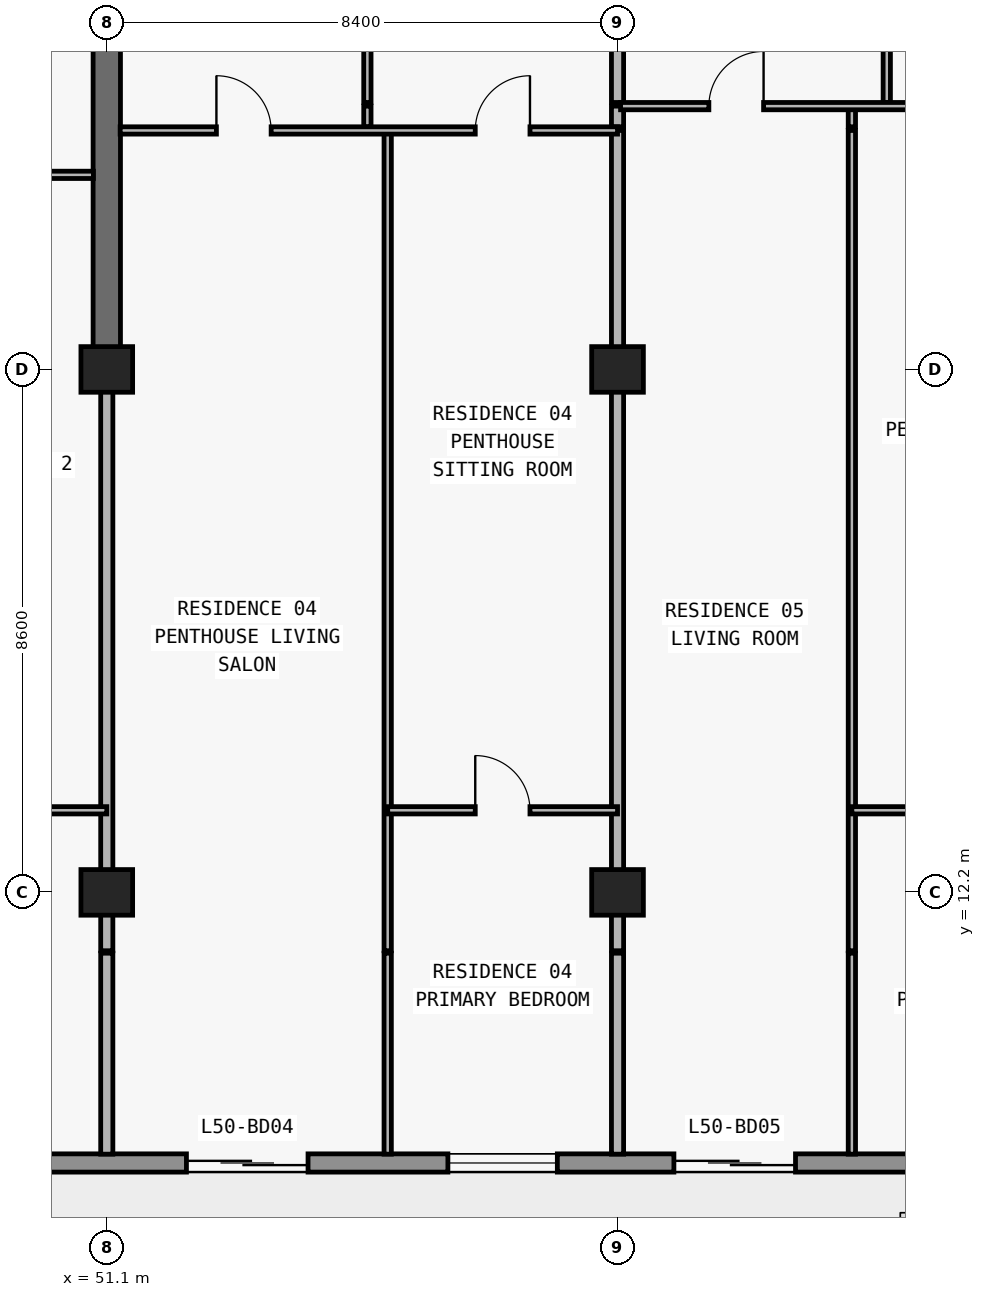
"""IFC4 building model, lengths in metres.
Left out: names, types, materials, properties, quantities, classifications, styles, units other than length and angle.
Written with IfcOpenShell. Run it as: python <this file> out.ifc"""

import sys

from ifc_helpers import new_model, si_unit, direction, frame, frame_2d, origin, origin_2d, place, context, subcontext, project, spatial, rectangle, extrude, element, fill, save


model = new_model("IFC4")
c1 = context("Model", 3, precision=1e-05, world=origin(), true_north=direction((0.0, 1.0)))
c2 = subcontext(c1, "Body", "Model", "MODEL_VIEW")
j1 = project(units=[si_unit("LENGTHUNIT", "METRE"), si_unit("PLANEANGLEUNIT", "RADIAN")], contexts=[c1])
p1 = place(None, origin())
s1 = spatial("IfcSite", under=j1, at=p1, CompositionType="ELEMENT")
p2 = place(p1, origin())
s2 = spatial("IfcBuilding", under=s1, at=p2, CompositionType="ELEMENT")
p3 = place(p2, frame((0.0, 0.0, 180.3)))
s3 = spatial("IfcBuildingStorey", under=s2, at=p3, CompositionType="ELEMENT", Elevation=180.3)
for number, where, z_axis, x_axis in (
    (1, (51.1, 12.2, 0.0), (0.0, 0.0, 1.0), (1.0, 0.0, 0.0)),
    (2, (59.5, 12.2, 0.0), (0.0, 0.0, 1.0), (1.0, 0.0, 0.0)),
    (3, (51.1, 20.8, 0.0), (0.0, 0.0, 1.0), (1.0, 0.0, 0.0)),
    (4, (59.5, 20.8, 0.0), (0.0, 0.0, 1.0), (1.0, 0.0, 0.0)),
):
    element("IfcColumn", number, at=place(p3, frame(where, z_axis=z_axis, x_axis=x_axis)), inside=s3, PredefinedType="COLUMN", context=c2, shape_type="SweptSolid", body=[
        extrude(rectangle(XDim=0.85, YDim=0.75, at=origin_2d()), origin(), (0.0, 0.0, 1.0), 3.0),
    ])
p4 = place(p3, frame((51.1, 20.8, 0.0), z_axis=(0.0, 0.0, 1.0), x_axis=(0.0, 1.0, 0.0)))
e5 = element("IfcWall", 5, at=p4, inside=s3, PredefinedType="SHEAR", context=c2, shape_type="SweptSolid", body=[
    extrude(rectangle(XDim=8.6, YDim=0.45, at=frame_2d((4.3, 0.0))), origin(), (0.0, 0.0, 1.0), 3.0),
])
p5 = place(p3, frame((67.7, 7.75, 0.0), z_axis=(0.0, 0.0, 1.0), x_axis=(-1.0, 0.0, 0.0)))
e6 = element("IfcWall", 6, at=p5, inside=s3, PredefinedType="STANDARD", context=c2, shape_type="SweptSolid", body=[
    extrude(rectangle(XDim=57.6, YDim=0.3, at=frame_2d((28.8, 0.0))), origin(), (0.0, 0.0, 1.0), 3.0),
])
p6 = place(p5, frame((54.673, 0.0, 0.0)))
e7 = element("IfcOpeningElement", 7, at=p6, cuts=e6, PredefinedType="OPENING", context=c2, shape_type="SweptSolid", body=[
    extrude(rectangle(XDim=2.0, YDim=2.3, at=frame_2d((1.0, 1.15))), frame((0.0, 0.16, 0.0), z_axis=(0.0, -1.0, 0.0), x_axis=(1.0, 0.0, 0.0)), (0.0, 0.0, 1.0), 0.32),
])
p7 = place(p5, frame((50.473, 0.0, 0.85)))
e8 = element("IfcOpeningElement", 8, at=p7, cuts=e6, PredefinedType="OPENING", context=c2, shape_type="SweptSolid", body=[
    extrude(rectangle(XDim=2.2, YDim=1.55, at=frame_2d((1.1, 0.775))), frame((0.0, 0.16, 0.0), z_axis=(0.0, -1.0, 0.0), x_axis=(1.0, 0.0, 0.0)), (0.0, 0.0, 1.0), 0.32),
])
p8 = place(p5, frame((46.09, 0.0, 0.0)))
e9 = element("IfcOpeningElement", 9, at=p8, cuts=e6, PredefinedType="OPENING", context=c2, shape_type="SweptSolid", body=[
    extrude(rectangle(XDim=2.0, YDim=2.3, at=frame_2d((1.0, 1.15))), frame((0.0, 0.16, 0.0), z_axis=(0.0, -1.0, 0.0), x_axis=(1.0, 0.0, 0.0)), (0.0, 0.0, 1.0), 0.32),
])
p9 = place(p5, frame((41.99, 0.0, 0.85)))
e10 = element("IfcOpeningElement", 10, at=p9, cuts=e6, PredefinedType="OPENING", context=c2, shape_type="SweptSolid", body=[
    extrude(rectangle(XDim=1.8, YDim=1.55, at=frame_2d((0.9, 0.775))), frame((0.0, 0.16, 0.0), z_axis=(0.0, -1.0, 0.0), x_axis=(1.0, 0.0, 0.0)), (0.0, 0.0, 1.0), 0.32),
])
p10 = place(p5, frame((38.09, 0.0, 0.0)))
e11 = element("IfcOpeningElement", 11, at=p10, cuts=e6, PredefinedType="OPENING", context=c2, shape_type="SweptSolid", body=[
    extrude(rectangle(XDim=2.0, YDim=2.3, at=frame_2d((1.0, 1.15))), frame((0.0, 0.16, 0.0), z_axis=(0.0, -1.0, 0.0), x_axis=(1.0, 0.0, 0.0)), (0.0, 0.0, 1.0), 0.32),
])
p11 = place(p5, frame((33.41, 0.0, 0.65)))
e12 = element("IfcOpeningElement", 12, at=p11, cuts=e6, PredefinedType="OPENING", context=c2, shape_type="SweptSolid", body=[
    extrude(rectangle(XDim=2.6, YDim=1.85, at=frame_2d((1.3, 0.925))), frame((0.0, 0.16, 0.0), z_axis=(0.0, -1.0, 0.0), x_axis=(1.0, 0.0, 0.0)), (0.0, 0.0, 1.0), 0.32),
])
p12 = place(p5, frame((27.7, 0.0, 0.85)))
e13 = element("IfcOpeningElement", 13, at=p12, cuts=e6, PredefinedType="OPENING", context=c2, shape_type="SweptSolid", body=[
    extrude(rectangle(XDim=2.2, YDim=1.55, at=frame_2d((1.1, 0.775))), frame((0.0, 0.16, 0.0), z_axis=(0.0, -1.0, 0.0), x_axis=(1.0, 0.0, 0.0)), (0.0, 0.0, 1.0), 0.32),
])
p13 = place(p5, frame((19.7, 0.0, 0.85)))
e14 = element("IfcOpeningElement", 14, at=p13, cuts=e6, PredefinedType="OPENING", context=c2, shape_type="SweptSolid", body=[
    extrude(rectangle(XDim=2.2, YDim=1.55, at=frame_2d((1.1, 0.775))), frame((0.0, 0.16, 0.0), z_axis=(0.0, -1.0, 0.0), x_axis=(1.0, 0.0, 0.0)), (0.0, 0.0, 1.0), 0.32),
])
p14 = place(p5, frame((13.29, 0.0, 0.0)))
e15 = element("IfcOpeningElement", 15, at=p14, cuts=e6, PredefinedType="OPENING", context=c2, shape_type="SweptSolid", body=[
    extrude(rectangle(XDim=2.0, YDim=2.3, at=frame_2d((1.0, 1.15))), frame((0.0, 0.16, 0.0), z_axis=(0.0, -1.0, 0.0), x_axis=(1.0, 0.0, 0.0)), (0.0, 0.0, 1.0), 0.32),
])
p15 = place(p5, frame((9.19, 0.0, 0.85)))
e16 = element("IfcOpeningElement", 16, at=p15, cuts=e6, PredefinedType="OPENING", context=c2, shape_type="SweptSolid", body=[
    extrude(rectangle(XDim=1.8, YDim=1.55, at=frame_2d((0.9, 0.775))), frame((0.0, 0.16, 0.0), z_axis=(0.0, -1.0, 0.0), x_axis=(1.0, 0.0, 0.0)), (0.0, 0.0, 1.0), 0.32),
])
p16 = place(p5, frame((5.273, 0.0, 0.0)))
e17 = element("IfcOpeningElement", 17, at=p16, cuts=e6, PredefinedType="OPENING", context=c2, shape_type="SweptSolid", body=[
    extrude(rectangle(XDim=2.0, YDim=2.3, at=frame_2d((1.0, 1.15))), frame((0.0, 0.16, 0.0), z_axis=(0.0, -1.0, 0.0), x_axis=(1.0, 0.0, 0.0)), (0.0, 0.0, 1.0), 0.32),
])
p17 = place(p5, frame((1.073, 0.0, 0.85)))
e18 = element("IfcOpeningElement", 18, at=p17, cuts=e6, PredefinedType="OPENING", context=c2, shape_type="SweptSolid", body=[
    extrude(rectangle(XDim=2.2, YDim=1.55, at=frame_2d((1.1, 0.775))), frame((0.0, 0.16, 0.0), z_axis=(0.0, -1.0, 0.0), x_axis=(1.0, 0.0, 0.0)), (0.0, 0.0, 1.0), 0.32),
])
p18 = place(p3, frame((51.1, 7.895, 0.0), z_axis=(0.0, 0.0, 1.0), x_axis=(0.0, 1.0, 0.0)))
e19 = element("IfcWall", 19, at=p18, inside=s3, PredefinedType="PARTITIONING", context=c2, shape_type="SweptSolid", body=[
    extrude(rectangle(XDim=3.305, YDim=0.2, at=frame_2d((1.652, 0.0))), origin(), (0.0, 0.0, 1.0), 3.0),
])
p19 = place(p3, frame((51.1, 11.24, 0.0), z_axis=(0.0, 0.0, 1.0), x_axis=(0.0, 1.0, 0.0)))
e20 = element("IfcWall", 20, at=p19, inside=s3, PredefinedType="PARTITIONING", context=c2, shape_type="SweptSolid", body=[
    extrude(rectangle(XDim=9.555, YDim=0.2, at=frame_2d((4.777, 0.0))), origin(), (0.0, 0.0, 1.0), 2.213),
])
p20 = place(p3, frame((55.386, 24.79, 0.0), z_axis=(0.0, 0.0, 1.0), x_axis=(0.0, 1.0, 0.0)))
e21 = element("IfcWall", 21, at=p20, inside=s3, PredefinedType="PARTITIONING", context=c2, shape_type="SweptSolid", body=[
    extrude(rectangle(XDim=0.34, YDim=0.12, at=frame_2d((0.17, 0.0))), origin(), (0.0, 0.0, 1.0), 3.0),
])
p21 = place(p3, frame((55.386, 25.19, 0.0), z_axis=(0.0, 0.0, 1.0), x_axis=(0.0, 1.0, 0.0)))
e22 = element("IfcWall", 22, at=p21, inside=s3, PredefinedType="PARTITIONING", context=c2, shape_type="SweptSolid", body=[
    extrude(rectangle(XDim=4.69, YDim=0.12, at=frame_2d((2.345, 0.0))), origin(), (0.0, 0.0, 1.0), 2.675),
])
p22 = place(p21, frame((1.895, 0.0, 0.0)))
e23 = element("IfcOpeningElement", 23, at=p22, cuts=e22, PredefinedType="OPENING", context=c2, shape_type="SweptSolid", body=[
    extrude(rectangle(XDim=0.9, YDim=2.15, at=frame_2d((0.45, 1.075))), frame((0.0, 0.07, 0.0), z_axis=(0.0, -1.0, 0.0), x_axis=(1.0, 0.0, 0.0)), (0.0, 0.0, 1.0), 0.14),
])
p23 = place(p3, frame((55.72, 7.895, 0.0), z_axis=(0.0, 0.0, 1.0), x_axis=(0.0, 1.0, 0.0)))
e24 = element("IfcWall", 24, at=p23, inside=s3, PredefinedType="PARTITIONING", context=c2, shape_type="SweptSolid", body=[
    extrude(rectangle(XDim=3.305, YDim=0.12, at=frame_2d((1.652, 0.0))), origin(), (0.0, 0.0, 1.0), 3.0),
])
p24 = place(p3, frame((55.72, 11.24, 0.0), z_axis=(0.0, 0.0, 1.0), x_axis=(0.0, 1.0, 0.0)))
e25 = element("IfcWall", 25, at=p24, inside=s3, PredefinedType="PARTITIONING", context=c2, shape_type="SweptSolid", body=[
    extrude(rectangle(XDim=13.49, YDim=0.12, at=frame_2d((6.745, 0.0))), origin(), (0.0, 0.0, 1.0), 3.0),
])
p25 = place(p3, frame((59.5, 7.895, 0.0), z_axis=(0.0, 0.0, 1.0), x_axis=(0.0, 1.0, 0.0)))
e26 = element("IfcWall", 26, at=p25, inside=s3, PredefinedType="PARTITIONING", context=c2, shape_type="SweptSolid", body=[
    extrude(rectangle(XDim=3.305, YDim=0.2, at=frame_2d((1.652, 0.0))), origin(), (0.0, 0.0, 1.0), 3.0),
])
p26 = place(p3, frame((59.5, 11.24, 0.0), z_axis=(0.0, 0.0, 1.0), x_axis=(0.0, 1.0, 0.0)))
e27 = element("IfcWall", 27, at=p26, inside=s3, PredefinedType="PARTITIONING", context=c2, shape_type="SweptSolid", body=[
    extrude(rectangle(XDim=13.49, YDim=0.2, at=frame_2d((6.745, 0.0))), origin(), (0.0, 0.0, 1.0), 2.213),
])
p27 = place(p3, frame((59.5, 24.79, 0.0), z_axis=(0.0, 0.0, 1.0), x_axis=(0.0, 1.0, 0.0)))
e28 = element("IfcWall", 28, at=p27, inside=s3, PredefinedType="PARTITIONING", context=c2, shape_type="SweptSolid", body=[
    extrude(rectangle(XDim=0.34, YDim=0.2, at=frame_2d((0.17, 0.0))), origin(), (0.0, 0.0, 1.0), 2.213),
])
p28 = place(p3, frame((59.5, 25.19, 0.0), z_axis=(0.0, 0.0, 1.0), x_axis=(0.0, 1.0, 0.0)))
e29 = element("IfcWall", 29, at=p28, inside=s3, PredefinedType="PARTITIONING", context=c2, shape_type="SweptSolid", body=[
    extrude(rectangle(XDim=4.69, YDim=0.2, at=frame_2d((2.345, 0.0))), origin(), (0.0, 0.0, 1.0), 2.213),
])
p29 = place(p3, frame((63.354, 7.895, 0.0), z_axis=(0.0, 0.0, 1.0), x_axis=(0.0, 1.0, 0.0)))
e30 = element("IfcWall", 30, at=p29, inside=s3, PredefinedType="PARTITIONING", context=c2, shape_type="SweptSolid", body=[
    extrude(rectangle(XDim=3.305, YDim=0.12, at=frame_2d((1.652, 0.0))), origin(), (0.0, 0.0, 1.0), 3.0),
])
p30 = place(p3, frame((63.354, 11.24, 0.0), z_axis=(0.0, 0.0, 1.0), x_axis=(0.0, 1.0, 0.0)))
e31 = element("IfcWall", 31, at=p30, inside=s3, PredefinedType="PARTITIONING", context=c2, shape_type="SweptSolid", body=[
    extrude(rectangle(XDim=13.49, YDim=0.12, at=frame_2d((6.745, 0.0))), origin(), (0.0, 0.0, 1.0), 3.0),
])
p31 = place(p3, frame((63.354, 24.79, 0.0), z_axis=(0.0, 0.0, 1.0), x_axis=(0.0, 1.0, 0.0)))
e32 = element("IfcWall", 32, at=p31, inside=s3, PredefinedType="PARTITIONING", context=c2, shape_type="SweptSolid", body=[
    extrude(rectangle(XDim=0.34, YDim=0.12, at=frame_2d((0.17, 0.0))), origin(), (0.0, 0.0, 1.0), 3.0),
])
p32 = place(p3, frame((63.928, 25.19, 0.0), z_axis=(0.0, 0.0, 1.0), x_axis=(0.0, 1.0, 0.0)))
e33 = element("IfcWall", 33, at=p32, inside=s3, PredefinedType="PARTITIONING", context=c2, shape_type="SweptSolid", body=[
    extrude(rectangle(XDim=4.69, YDim=0.12, at=frame_2d((2.345, 0.0))), origin(), (0.0, 0.0, 1.0), 3.0),
])
p33 = place(p32, frame((1.895, 0.0, 0.0)))
e34 = element("IfcOpeningElement", 34, at=p33, cuts=e33, PredefinedType="OPENING", context=c2, shape_type="SweptSolid", body=[
    extrude(rectangle(XDim=0.9, YDim=2.15, at=frame_2d((0.45, 1.075))), frame((0.0, 0.07, 0.0), z_axis=(0.0, -1.0, 0.0), x_axis=(1.0, 0.0, 0.0)), (0.0, 0.0, 1.0), 0.14),
])
p34 = place(p3, frame((35.1, 13.55, 0.0), z_axis=(0.0, 0.0, 1.0), x_axis=(1.0, 0.0, 0.0)))
e35 = element("IfcWall", 35, at=p34, inside=s3, PredefinedType="PARTITIONING", context=c2, shape_type="SweptSolid", body=[
    extrude(rectangle(XDim=16.0, YDim=0.12, at=frame_2d((8.0, 0.0))), origin(), (0.0, 0.0, 1.0), 3.0),
])
p35 = place(p34, frame((3.35, 0.0, 0.0)))
e36 = element("IfcOpeningElement", 36, at=p35, cuts=e35, PredefinedType="OPENING", context=c2, shape_type="SweptSolid", body=[
    extrude(rectangle(XDim=0.9, YDim=2.15, at=frame_2d((0.45, 1.075))), frame((0.0, 0.07, 0.0), z_axis=(0.0, -1.0, 0.0), x_axis=(1.0, 0.0, 0.0)), (0.0, 0.0, 1.0), 0.14),
])
p36 = place(p34, frame((11.35, 0.0, 0.0)))
e37 = element("IfcOpeningElement", 37, at=p36, cuts=e35, PredefinedType="OPENING", context=c2, shape_type="SweptSolid", body=[
    extrude(rectangle(XDim=0.9, YDim=2.15, at=frame_2d((0.45, 1.075))), frame((0.0, 0.07, 0.0), z_axis=(0.0, -1.0, 0.0), x_axis=(1.0, 0.0, 0.0)), (0.0, 0.0, 1.0), 0.14),
])
p37 = place(p3, frame((55.72, 13.55, 0.0), z_axis=(0.0, 0.0, 1.0), x_axis=(1.0, 0.0, 0.0)))
e38 = element("IfcWall", 38, at=p37, inside=s3, PredefinedType="PARTITIONING", context=c2, shape_type="SweptSolid", body=[
    extrude(rectangle(XDim=3.78, YDim=0.12, at=frame_2d((1.89, 0.0))), origin(), (0.0, 0.0, 1.0), 3.0),
])
p38 = place(p37, frame((1.44, 0.0, 0.0)))
e39 = element("IfcOpeningElement", 39, at=p38, cuts=e38, PredefinedType="OPENING", context=c2, shape_type="SweptSolid", body=[
    extrude(rectangle(XDim=0.9, YDim=2.15, at=frame_2d((0.45, 1.075))), frame((0.0, 0.07, 0.0), z_axis=(0.0, -1.0, 0.0), x_axis=(1.0, 0.0, 0.0)), (0.0, 0.0, 1.0), 0.14),
])
p39 = place(p3, frame((63.354, 13.55, 0.0), z_axis=(0.0, 0.0, 1.0), x_axis=(1.0, 0.0, 0.0)))
e40 = element("IfcWall", 40, at=p39, inside=s3, PredefinedType="PARTITIONING", context=c2, shape_type="SweptSolid", body=[
    extrude(rectangle(XDim=1.926, YDim=0.12, at=frame_2d((0.963, 0.0))), origin(), (0.0, 0.0, 1.0), 3.0),
])
p40 = place(p3, frame((42.7, 24.0, 0.0), z_axis=(0.0, 0.0, 1.0), x_axis=(1.0, 0.0, 0.0)))
e41 = element("IfcWall", 41, at=p40, inside=s3, PredefinedType="PARTITIONING", context=c2, shape_type="SweptSolid", body=[
    extrude(rectangle(XDim=8.18, YDim=0.12, at=frame_2d((4.09, 0.0))), origin(), (0.0, 0.0, 1.0), 3.0),
])
p41 = place(p40, frame((3.64, 0.0, 0.0)))
e42 = element("IfcOpeningElement", 42, at=p41, cuts=e41, PredefinedType="OPENING", context=c2, shape_type="SweptSolid", body=[
    extrude(rectangle(XDim=0.9, YDim=2.15, at=frame_2d((0.45, 1.075))), frame((0.0, 0.07, 0.0), z_axis=(0.0, -1.0, 0.0), x_axis=(1.0, 0.0, 0.0)), (0.0, 0.0, 1.0), 0.14),
])
p42 = place(p3, frame((51.32, 24.73, 0.0), z_axis=(0.0, 0.0, 1.0), x_axis=(1.0, 0.0, 0.0)))
e43 = element("IfcWall", 43, at=p42, inside=s3, PredefinedType="PARTITIONING", context=c2, shape_type="SweptSolid", body=[
    extrude(rectangle(XDim=8.18, YDim=0.12, at=frame_2d((4.09, 0.0))), origin(), (0.0, 0.0, 1.0), 3.0),
])
p43 = place(p42, frame((1.583, 0.0, 0.0)))
e44 = element("IfcOpeningElement", 44, at=p43, cuts=e43, PredefinedType="OPENING", context=c2, shape_type="SweptSolid", body=[
    extrude(rectangle(XDim=0.9, YDim=2.15, at=frame_2d((0.45, 1.075))), frame((0.0, 0.07, 0.0), z_axis=(0.0, -1.0, 0.0), x_axis=(1.0, 0.0, 0.0)), (0.0, 0.0, 1.0), 0.14),
])
p44 = place(p42, frame((5.84, 0.0, 0.0)))
e45 = element("IfcOpeningElement", 45, at=p44, cuts=e43, PredefinedType="OPENING", context=c2, shape_type="SweptSolid", body=[
    extrude(rectangle(XDim=0.9, YDim=2.15, at=frame_2d((0.45, 1.075))), frame((0.0, 0.07, 0.0), z_axis=(0.0, -1.0, 0.0), x_axis=(1.0, 0.0, 0.0)), (0.0, 0.0, 1.0), 0.14),
])
p45 = place(p3, frame((59.55, 25.13, 0.0), z_axis=(0.0, 0.0, 1.0), x_axis=(1.0, 0.0, 0.0)))
e46 = element("IfcWall", 46, at=p45, inside=s3, PredefinedType="PARTITIONING", context=c2, shape_type="SweptSolid", body=[
    extrude(rectangle(XDim=5.73, YDim=0.12, at=frame_2d((2.865, 0.0))), origin(), (0.0, 0.0, 1.0), 3.0),
])
p46 = place(p45, frame((1.452, 0.0, 0.0)))
e47 = element("IfcOpeningElement", 47, at=p46, cuts=e46, PredefinedType="OPENING", context=c2, shape_type="SweptSolid", body=[
    extrude(rectangle(XDim=0.9, YDim=2.15, at=frame_2d((0.45, 1.075))), frame((0.0, 0.07, 0.0), z_axis=(0.0, -1.0, 0.0), x_axis=(1.0, 0.0, 0.0)), (0.0, 0.0, 1.0), 0.14),
])
p47 = place(p14, origin())
e48 = element("IfcDoor", 48, at=p47, inside=s3, OperationType="DOUBLE_DOOR_SLIDING", PredefinedType="DOOR", context=c2, shape_type="SweptSolid", body=[
    extrude(rectangle(XDim=2.0, YDim=2.3, at=frame_2d((1.0, 1.15))), frame((0.0, 0.025, 0.0), z_axis=(0.0, -1.0, 0.0), x_axis=(1.0, 0.0, 0.0)), (0.0, 0.0, 1.0), 0.05),
])
fill(e15, e48)
p48 = place(p15, origin())
e49 = element("IfcWindow", 49, at=p48, inside=s3, PartitioningType="SINGLE_PANEL", PredefinedType="WINDOW", context=c2, shape_type="SweptSolid", body=[
    extrude(rectangle(XDim=1.8, YDim=1.55, at=frame_2d((0.9, 0.775))), frame((0.0, 0.03, 0.0), z_axis=(0.0, -1.0, 0.0), x_axis=(1.0, 0.0, 0.0)), (0.0, 0.0, 1.0), 0.06),
])
fill(e16, e49)
p49 = place(p16, origin())
e50 = element("IfcDoor", 50, at=p49, inside=s3, OperationType="DOUBLE_DOOR_SLIDING", PredefinedType="DOOR", context=c2, shape_type="SweptSolid", body=[
    extrude(rectangle(XDim=2.0, YDim=2.3, at=frame_2d((1.0, 1.15))), frame((0.0, 0.025, 0.0), z_axis=(0.0, -1.0, 0.0), x_axis=(1.0, 0.0, 0.0)), (0.0, 0.0, 1.0), 0.05),
])
fill(e17, e50)
p50 = place(p43, origin())
e51 = element("IfcDoor", 51, at=p50, inside=s3, OperationType="SINGLE_SWING_LEFT", PredefinedType="DOOR", context=c2, shape_type="SweptSolid", body=[
    extrude(rectangle(XDim=0.9, YDim=2.15, at=frame_2d((0.45, 1.075))), frame((0.0, 0.025, 0.0), z_axis=(0.0, -1.0, 0.0), x_axis=(1.0, 0.0, 0.0)), (0.0, 0.0, 1.0), 0.05),
])
fill(e44, e51)
p51 = place(p44, origin())
e52 = element("IfcDoor", 52, at=p51, inside=s3, OperationType="SINGLE_SWING_RIGHT", PredefinedType="DOOR", context=c2, shape_type="SweptSolid", body=[
    extrude(rectangle(XDim=0.9, YDim=2.15, at=frame_2d((0.45, 1.075))), frame((0.0, 0.025, 0.0), z_axis=(0.0, -1.0, 0.0), x_axis=(1.0, 0.0, 0.0)), (0.0, 0.0, 1.0), 0.05),
])
fill(e45, e52)
p52 = place(p38, origin())
e53 = element("IfcDoor", 53, at=p52, inside=s3, OperationType="SINGLE_SWING_LEFT", PredefinedType="DOOR", context=c2, shape_type="SweptSolid", body=[
    extrude(rectangle(XDim=0.9, YDim=2.15, at=frame_2d((0.45, 1.075))), frame((0.0, 0.025, 0.0), z_axis=(0.0, -1.0, 0.0), x_axis=(1.0, 0.0, 0.0)), (0.0, 0.0, 1.0), 0.05),
])
fill(e39, e53)
p53 = place(p46, origin())
e54 = element("IfcDoor", 54, at=p53, inside=s3, OperationType="SINGLE_SWING_RIGHT", PredefinedType="DOOR", context=c2, shape_type="SweptSolid", body=[
    extrude(rectangle(XDim=0.9, YDim=2.15, at=frame_2d((0.45, 1.075))), frame((0.0, 0.025, 0.0), z_axis=(0.0, -1.0, 0.0), x_axis=(1.0, 0.0, 0.0)), (0.0, 0.0, 1.0), 0.05),
])
fill(e47, e54)
save(model, sys.argv[1])
